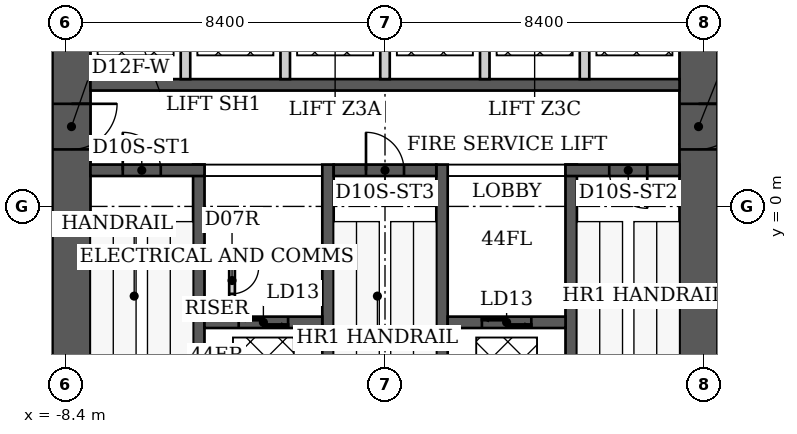
"""IFC4 building model, lengths in metres.
Left out: names, types, materials, properties, quantities, classifications, styles, units other than length and angle.
Written with IfcOpenShell. Run it as: python <this file> out.ifc"""

import sys

from ifc_helpers import new_model, si_unit, direction, frame, frame_2d, origin, place, context, subcontext, project, spatial, rectangle, extrude, element, fill, save


model = new_model("IFC4")
c1 = context("Model", 3, precision=1e-05, world=origin(), true_north=direction((0.0, 1.0)))
c2 = subcontext(c1, "Body", "Model", "MODEL_VIEW")
j1 = project(units=[si_unit("LENGTHUNIT", "METRE"), si_unit("PLANEANGLEUNIT", "RADIAN")], contexts=[c1])
p1 = place(None, origin())
s1 = spatial("IfcSite", under=j1, at=p1, CompositionType="ELEMENT")
p2 = place(p1, origin())
s2 = spatial("IfcBuilding", under=s1, at=p2, CompositionType="ELEMENT")
p3 = place(p2, frame((0.0, 0.0, 178.2)))
s3 = spatial("IfcBuildingStorey", under=s2, at=p3, CompositionType="ELEMENT", Elevation=178.2)
p4 = place(p3, frame((-8.25, -6.1, 0.0), z_axis=(0.0, 0.0, 1.0), x_axis=(0.0, 1.0, 0.0)))
e1 = element("IfcWall", 1, at=p4, inside=s3, PredefinedType="SHEAR", context=c2, shape_type="SweptSolid", body=[
    extrude(rectangle(XDim=12.2, YDim=1.0, at=frame_2d((6.1, 0.0))), origin(), (0.0, 0.0, 1.0), 5.0),
])
p5 = place(p4, frame((7.6, 0.0, 0.0)))
e2 = element("IfcOpeningElement", 2, at=p5, cuts=e1, PredefinedType="OPENING", context=c2, shape_type="SweptSolid", body=[
    extrude(rectangle(XDim=1.2, YDim=2.2, at=frame_2d((0.6, 1.1))), frame((0.0, 0.5, 0.0), z_axis=(0.0, -1.0, 0.0), x_axis=(1.0, 0.0, 0.0)), (0.0, 0.0, 1.0), 1.0),
])
p6 = place(p3, frame((8.25, -6.1, 0.0), z_axis=(0.0, 0.0, 1.0), x_axis=(0.0, 1.0, 0.0)))
e3 = element("IfcWall", 3, at=p6, inside=s3, PredefinedType="SHEAR", context=c2, shape_type="SweptSolid", body=[
    extrude(rectangle(XDim=12.2, YDim=1.0, at=frame_2d((6.1, 0.0))), origin(), (0.0, 0.0, 1.0), 5.0),
])
p7 = place(p6, frame((7.6, 0.0, 0.0)))
e4 = element("IfcOpeningElement", 4, at=p7, cuts=e3, PredefinedType="OPENING", context=c2, shape_type="SweptSolid", body=[
    extrude(rectangle(XDim=1.2, YDim=2.2, at=frame_2d((0.6, 1.1))), frame((0.0, 0.5, 0.0), z_axis=(0.0, -1.0, 0.0), x_axis=(1.0, 0.0, 0.0)), (0.0, 0.0, 1.0), 1.0),
])
for number, where, z_axis, x_axis in (
    (5, (-4.9, -6.1, 0.0), (0.0, 0.0, 1.0), (0.0, 1.0, 0.0)),
    (6, (-1.5, -6.1, 0.0), (0.0, 0.0, 1.0), (0.0, 1.0, 0.0)),
    (7, (1.5, -6.1, 0.0), (0.0, 0.0, 1.0), (0.0, 1.0, 0.0)),
    (8, (4.9, -6.1, 0.0), (0.0, 0.0, 1.0), (0.0, 1.0, 0.0)),
):
    element("IfcWall", number, at=place(p3, frame(where, z_axis=z_axis, x_axis=x_axis)), inside=s3, PredefinedType="SHEAR", context=c2, shape_type="SweptSolid", body=[
        extrude(rectangle(XDim=7.2, YDim=0.3, at=frame_2d((3.6, 0.0))), origin(), (0.0, 0.0, 1.0), 5.0),
    ])
p8 = place(p3, frame((-7.75, 0.95, 0.0), z_axis=(0.0, 0.0, 1.0), x_axis=(1.0, 0.0, 0.0)))
e9 = element("IfcWall", 9, at=p8, inside=s3, PredefinedType="SHEAR", context=c2, shape_type="SweptSolid", body=[
    extrude(rectangle(XDim=3.0, YDim=0.3, at=frame_2d((1.5, 0.0))), origin(), (0.0, 0.0, 1.0), 5.0),
])
p9 = place(p8, frame((0.85, 0.0, 0.0)))
e10 = element("IfcOpeningElement", 10, at=p9, cuts=e9, PredefinedType="OPENING", context=c2, shape_type="SweptSolid", body=[
    extrude(rectangle(XDim=1.0, YDim=2.2, at=frame_2d((0.5, 1.1))), frame((0.0, 0.15, 0.0), z_axis=(0.0, -1.0, 0.0), x_axis=(1.0, 0.0, 0.0)), (0.0, 0.0, 1.0), 0.3),
])
p10 = place(p3, frame((-1.35, 0.95, 0.0), z_axis=(0.0, 0.0, 1.0), x_axis=(1.0, 0.0, 0.0)))
e11 = element("IfcWall", 11, at=p10, inside=s3, PredefinedType="SHEAR", context=c2, shape_type="SweptSolid", body=[
    extrude(rectangle(XDim=2.7, YDim=0.3, at=frame_2d((1.35, 0.0))), origin(), (0.0, 0.0, 1.0), 5.0),
])
p11 = place(p10, frame((0.85, 0.0, 0.0)))
e12 = element("IfcOpeningElement", 12, at=p11, cuts=e11, PredefinedType="OPENING", context=c2, shape_type="SweptSolid", body=[
    extrude(rectangle(XDim=1.0, YDim=2.2, at=frame_2d((0.5, 1.1))), frame((0.0, 0.15, 0.0), z_axis=(0.0, -1.0, 0.0), x_axis=(1.0, 0.0, 0.0)), (0.0, 0.0, 1.0), 0.3),
])
p12 = place(p3, frame((4.75, 0.95, 0.0), z_axis=(0.0, 0.0, 1.0), x_axis=(1.0, 0.0, 0.0)))
e13 = element("IfcWall", 13, at=p12, inside=s3, PredefinedType="SHEAR", context=c2, shape_type="SweptSolid", body=[
    extrude(rectangle(XDim=3.0, YDim=0.3, at=frame_2d((1.5, 0.0))), origin(), (0.0, 0.0, 1.0), 5.0),
])
p13 = place(p12, frame((1.15, 0.0, 0.0)))
e14 = element("IfcOpeningElement", 14, at=p13, cuts=e13, PredefinedType="OPENING", context=c2, shape_type="SweptSolid", body=[
    extrude(rectangle(XDim=1.0, YDim=2.2, at=frame_2d((0.5, 1.1))), frame((0.0, 0.15, 0.0), z_axis=(0.0, -1.0, 0.0), x_axis=(1.0, 0.0, 0.0)), (0.0, 0.0, 1.0), 0.3),
])
p14 = place(p3, frame((-4.75, -3.05, 0.0), z_axis=(0.0, 0.0, 1.0), x_axis=(1.0, 0.0, 0.0)))
e15 = element("IfcWall", 15, at=p14, inside=s3, PredefinedType="SHEAR", context=c2, shape_type="SweptSolid", body=[
    extrude(rectangle(XDim=3.1, YDim=0.3, at=frame_2d((1.55, 0.0))), origin(), (0.0, 0.0, 1.0), 5.0),
])
p15 = place(p14, frame((0.9, 0.0, 0.0)))
e16 = element("IfcOpeningElement", 16, at=p15, cuts=e15, PredefinedType="OPENING", context=c2, shape_type="SweptSolid", body=[
    extrude(rectangle(XDim=1.3, YDim=2.1, at=frame_2d((0.65, 1.05))), frame((0.0, 0.15, 0.0), z_axis=(0.0, -1.0, 0.0), x_axis=(1.0, 0.0, 0.0)), (0.0, 0.0, 1.0), 0.3),
])
p16 = place(p3, frame((1.65, -3.05, 0.0), z_axis=(0.0, 0.0, 1.0), x_axis=(1.0, 0.0, 0.0)))
e17 = element("IfcWall", 17, at=p16, inside=s3, PredefinedType="SHEAR", context=c2, shape_type="SweptSolid", body=[
    extrude(rectangle(XDim=3.1, YDim=0.3, at=frame_2d((1.55, 0.0))), origin(), (0.0, 0.0, 1.0), 5.0),
])
p17 = place(p16, frame((0.9, 0.0, 0.0)))
e18 = element("IfcOpeningElement", 18, at=p17, cuts=e17, PredefinedType="OPENING", context=c2, shape_type="SweptSolid", body=[
    extrude(rectangle(XDim=1.3, YDim=2.1, at=frame_2d((0.65, 1.05))), frame((0.0, 0.15, 0.0), z_axis=(0.0, -1.0, 0.0), x_axis=(1.0, 0.0, 0.0)), (0.0, 0.0, 1.0), 0.3),
])
p18 = place(p3, frame((-7.75, 3.2, 0.0), z_axis=(0.0, 0.0, 1.0), x_axis=(1.0, 0.0, 0.0)))
e19 = element("IfcWall", 19, at=p18, inside=s3, PredefinedType="SHEAR", context=c2, shape_type="SweptSolid", body=[
    extrude(rectangle(XDim=15.5, YDim=0.3, at=frame_2d((7.75, 0.0))), origin(), (0.0, 0.0, 1.0), 5.0),
])
for number, where, z_axis, x_axis in (
    (20, (-5.25, 3.35, 0.0), (0.0, 0.0, 1.0), (0.0, 1.0, 0.0)),
    (21, (-2.625, 3.35, 0.0), (0.0, 0.0, 1.0), (0.0, 1.0, 0.0)),
    (22, (0.0, 3.35, 0.0), (0.0, 0.0, 1.0), (0.0, 1.0, 0.0)),
    (23, (2.625, 3.35, 0.0), (0.0, 0.0, 1.0), (0.0, 1.0, 0.0)),
    (24, (5.25, 3.35, 0.0), (0.0, 0.0, 1.0), (0.0, 1.0, 0.0)),
):
    element("IfcWall", number, at=place(p3, frame(where, z_axis=z_axis, x_axis=x_axis)), inside=s3, PredefinedType="PARTITIONING", context=c2, shape_type="SweptSolid", body=[
        extrude(rectangle(XDim=2.75, YDim=0.25, at=frame_2d((1.375, 0.0))), origin(), (0.0, 0.0, 1.0), 5.0),
    ])
p19 = place(p3, frame((-4.025, -2.9, 0.0), z_axis=(0.0, 0.0, 1.0), x_axis=(0.0, 1.0, 0.0)))
e25 = element("IfcWall", 25, at=p19, inside=s3, PredefinedType="PARTITIONING", context=c2, shape_type="SweptSolid", body=[
    extrude(rectangle(XDim=1.775, YDim=0.15, at=frame_2d((0.887, 0.0))), origin(), (0.0, 0.0, 1.0), 4.84),
])
p20 = place(p19, frame((0.6, 0.0, 0.0)))
e26 = element("IfcOpeningElement", 26, at=p20, cuts=e25, PredefinedType="OPENING", context=c2, shape_type="SweptSolid", body=[
    extrude(rectangle(XDim=0.7, YDim=2.1, at=frame_2d((0.35, 1.05))), frame((0.0, 0.075, 0.0), z_axis=(0.0, -1.0, 0.0), x_axis=(1.0, 0.0, 0.0)), (0.0, 0.0, 1.0), 0.15),
])
p21 = place(p3, frame((-4.75, -1.2, 0.0), z_axis=(0.0, 0.0, 1.0), x_axis=(1.0, 0.0, 0.0)))
e27 = element("IfcWall", 27, at=p21, inside=s3, PredefinedType="PARTITIONING", context=c2, shape_type="SweptSolid", body=[
    extrude(rectangle(XDim=0.8, YDim=0.15, at=frame_2d((0.4, 0.0))), origin(), (0.0, 0.0, 1.0), 4.84),
])
p22 = place(p9, origin())
e28 = element("IfcDoor", 28, at=p22, inside=s3, OperationType="SINGLE_SWING_LEFT", PredefinedType="DOOR", context=c2, shape_type="SweptSolid", body=[
    extrude(rectangle(XDim=1.0, YDim=2.2, at=frame_2d((0.5, 1.1))), frame((0.0, 0.025, 0.0), z_axis=(0.0, -1.0, 0.0), x_axis=(1.0, 0.0, 0.0)), (0.0, 0.0, 1.0), 0.05),
])
fill(e10, e28)
p23 = place(p11, origin())
e29 = element("IfcDoor", 29, at=p23, inside=s3, OperationType="SINGLE_SWING_LEFT", PredefinedType="DOOR", context=c2, shape_type="SweptSolid", body=[
    extrude(rectangle(XDim=1.0, YDim=2.2, at=frame_2d((0.5, 1.1))), frame((0.0, 0.025, 0.0), z_axis=(0.0, -1.0, 0.0), x_axis=(1.0, 0.0, 0.0)), (0.0, 0.0, 1.0), 0.05),
])
fill(e12, e29)
p24 = place(p13, origin())
e30 = element("IfcDoor", 30, at=p24, inside=s3, OperationType="SINGLE_SWING_RIGHT", PredefinedType="DOOR", context=c2, shape_type="SweptSolid", body=[
    extrude(rectangle(XDim=1.0, YDim=2.2, at=frame_2d((0.5, 1.1))), frame((0.0, 0.025, 0.0), z_axis=(0.0, -1.0, 0.0), x_axis=(1.0, 0.0, 0.0)), (0.0, 0.0, 1.0), 0.05),
])
fill(e14, e30)
p25 = place(p5, origin())
e31 = element("IfcDoor", 31, at=p25, inside=s3, OperationType="SINGLE_SWING_RIGHT", PredefinedType="DOOR", context=c2, shape_type="SweptSolid", body=[
    extrude(rectangle(XDim=1.2, YDim=2.2, at=frame_2d((0.6, 1.1))), frame((0.0, 0.025, 0.0), z_axis=(0.0, -1.0, 0.0), x_axis=(1.0, 0.0, 0.0)), (0.0, 0.0, 1.0), 0.05),
])
fill(e2, e31)
p26 = place(p7, origin())
e32 = element("IfcDoor", 32, at=p26, inside=s3, OperationType="SINGLE_SWING_RIGHT", PredefinedType="DOOR", context=c2, shape_type="SweptSolid", body=[
    extrude(rectangle(XDim=1.2, YDim=2.2, at=frame_2d((0.6, 1.1))), frame((0.0, 0.025, 0.0), z_axis=(0.0, -1.0, 0.0), x_axis=(1.0, 0.0, 0.0)), (0.0, 0.0, 1.0), 0.05),
])
fill(e4, e32)
p27 = place(p20, origin())
e33 = element("IfcDoor", 33, at=p27, inside=s3, OperationType="SINGLE_SWING_RIGHT", PredefinedType="DOOR", context=c2, shape_type="SweptSolid", body=[
    extrude(rectangle(XDim=0.7, YDim=2.1, at=frame_2d((0.35, 1.05))), frame((0.0, 0.025, 0.0), z_axis=(0.0, -1.0, 0.0), x_axis=(1.0, 0.0, 0.0)), (0.0, 0.0, 1.0), 0.05),
])
fill(e26, e33)
p28 = place(p15, origin())
e34 = element("IfcDoor", 34, at=p28, inside=s3, OperationType="DOUBLE_DOOR_SLIDING", PredefinedType="DOOR", context=c2, shape_type="SweptSolid", body=[
    extrude(rectangle(XDim=1.3, YDim=2.1, at=frame_2d((0.65, 1.05))), frame((0.0, 0.025, 0.0), z_axis=(0.0, -1.0, 0.0), x_axis=(1.0, 0.0, 0.0)), (0.0, 0.0, 1.0), 0.05),
])
fill(e16, e34)
p29 = place(p17, origin())
e35 = element("IfcDoor", 35, at=p29, inside=s3, OperationType="DOUBLE_DOOR_SLIDING", PredefinedType="DOOR", context=c2, shape_type="SweptSolid", body=[
    extrude(rectangle(XDim=1.3, YDim=2.1, at=frame_2d((0.65, 1.05))), frame((0.0, 0.025, 0.0), z_axis=(0.0, -1.0, 0.0), x_axis=(1.0, 0.0, 0.0)), (0.0, 0.0, 1.0), 0.05),
])
fill(e18, e35)
save(model, sys.argv[1])
